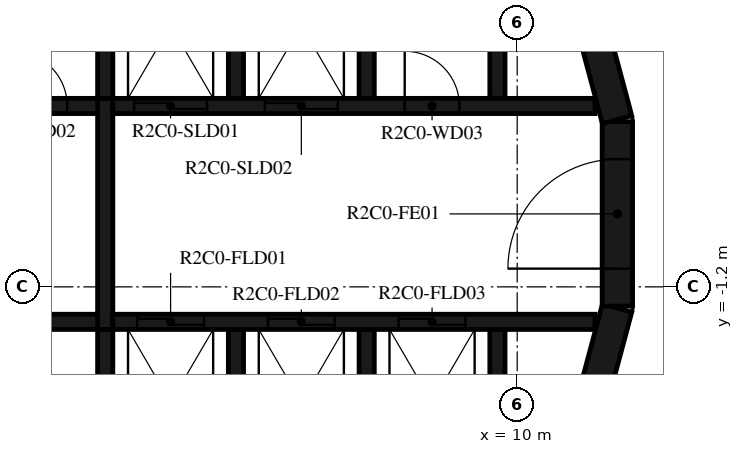
"""IFC4 building model, lengths in metres.
Left out: names, types, materials, properties, quantities, classifications, styles, units other than length and angle.
Written with IfcOpenShell. Run it as: python <this file> out.ifc"""

import sys

from ifc_helpers import new_model, si_unit, direction, frame, frame_2d, origin, place, context, subcontext, project, spatial, polyline, rectangle, outline, extrude, element, fill, save


model = new_model("IFC4")
c1 = context("Model", 3, precision=1e-05, world=origin(), true_north=direction((0.0, 1.0)))
c2 = subcontext(c1, "Body", "Model", "MODEL_VIEW")
j1 = project(units=[si_unit("LENGTHUNIT", "METRE"), si_unit("PLANEANGLEUNIT", "RADIAN")], contexts=[c1])
p1 = place(None, origin())
s1 = spatial("IfcSite", under=j1, at=p1, CompositionType="ELEMENT")
p2 = place(p1, origin())
s2 = spatial("IfcBuilding", under=s1, at=p2, CompositionType="ELEMENT")
p3 = place(p2, frame((0.0, 0.0, 97.7)))
s3 = spatial("IfcBuildingStorey", under=s2, at=p3, CompositionType="ELEMENT", Elevation=97.7)
p4 = place(p3, frame((10.858, -4.479, 0.0), z_axis=(0.0, 0.0, 1.0), x_axis=(0.258734743916, 0.965948410781, 0.0)))
e1 = element("IfcWall", 1, at=p4, inside=s3, PredefinedType="SHEAR", context=c2, shape_type="SweptSolid", body=[
    extrude(rectangle(XDim=3.033, YDim=0.5, at=frame_2d((1.516, 0.0))), origin(), (0.0, 0.0, 1.0), 3.12),
])
p5 = place(p3, frame((11.647, -1.516, 0.0), z_axis=(0.0, 0.0, 1.0), x_axis=(0.0, 1.0, 0.0)))
e2 = element("IfcWall", 2, at=p5, inside=s3, PredefinedType="SHEAR", context=c2, shape_type="SweptSolid", body=[
    extrude(rectangle(XDim=3.033, YDim=0.5, at=frame_2d((1.516, 0.0))), origin(), (0.0, 0.0, 1.0), 3.12),
])
p6 = place(p5, frame((0.616, 0.0, 0.0)))
e3 = element("IfcOpeningElement", 3, at=p6, cuts=e2, PredefinedType="OPENING", context=c2, shape_type="SweptSolid", body=[
    extrude(rectangle(XDim=1.8, YDim=2.1, at=frame_2d((0.9, 1.05))), frame((0.0, 0.26, 0.0), z_axis=(0.0, -1.0, 0.0), x_axis=(1.0, 0.0, 0.0)), (0.0, 0.0, 1.0), 0.52),
])
p7 = place(p3, frame((11.643, 1.55, 0.0), z_axis=(0.0, 0.0, 1.0), x_axis=(-0.258734743916, 0.965948410781, 0.0)))
e4 = element("IfcWall", 4, at=p7, inside=s3, PredefinedType="SHEAR", context=c2, shape_type="SweptSolid", body=[
    extrude(rectangle(XDim=3.033, YDim=0.5, at=frame_2d((1.516, 0.0))), origin(), (0.0, 0.0, 1.0), 3.12),
])
p8 = place(p3, origin())
e5 = element("IfcWall", 5, at=p8, inside=s3, PredefinedType="SHEAR", context=c2, shape_type="SweptSolid", body=[
    extrude(outline(polyline([(-9.55, 4.8), (-7.65, 4.8), (-7.65, 1.9), (-7.4, 1.9), (-7.4, 4.8), (-5.5, 4.8), (-5.5, 1.9), (-5.25, 1.9), (-5.25, 4.8), (-3.35, 4.8), (-3.35, 1.9), (-3.1, 1.9), (-3.1, 4.8), (-1.2, 4.8), (-1.2, 1.9), (-0.95, 1.9), (-0.95, 4.8), (0.95, 4.8), (0.95, 1.9), (1.2, 1.9), (1.2, 4.8), (3.1, 4.8), (3.1, 1.9), (3.35, 1.9), (3.35, 4.8), (5.25, 4.8), (5.25, 1.9), (5.5, 1.9), (5.5, 4.8), (7.4, 4.8), (7.4, 1.9), (7.65, 1.9), (7.65, 4.8), (9.55, 4.8), (9.55, 1.9), (9.8, 1.9), (9.8, 4.8), (9.8, 5.05), (-9.8, 5.05), (-9.8, 4.8), (-9.8, 1.9), (-9.55, 1.9), (-9.55, 4.8)])), origin(), (0.0, 0.0, 1.0), 3.12),
])
p9 = place(p3, origin())
e6 = element("IfcWall", 6, at=p9, inside=s3, PredefinedType="SHEAR", context=c2, shape_type="SweptSolid", body=[
    extrude(outline(polyline([(9.8, -5.05), (9.8, -4.8), (9.8, -1.9), (9.55, -1.9), (9.55, -4.8), (7.65, -4.8), (7.65, -1.9), (7.4, -1.9), (7.4, -4.8), (5.5, -4.8), (5.5, -1.9), (5.25, -1.9), (5.25, -4.8), (3.35, -4.8), (3.35, -1.9), (3.1, -1.9), (3.1, -4.8), (-5.25, -4.8), (-5.25, -1.9), (-5.5, -1.9), (-5.5, -4.8), (-7.4, -4.8), (-7.4, -1.9), (-7.65, -1.9), (-7.65, -4.8), (-9.55, -4.8), (-9.55, -1.9), (-9.8, -1.9), (-9.8, -4.8), (-9.8, -5.05), (9.8, -5.05)])), origin(), (0.0, 0.0, 1.0), 3.12),
])
p10 = place(p3, frame((-11.28, 1.775, 0.0), z_axis=(0.0, 0.0, 1.0), x_axis=(1.0, 0.0, 0.0)))
e7 = element("IfcWall", 7, at=p10, inside=s3, PredefinedType="SHEAR", context=c2, shape_type="SweptSolid", body=[
    extrude(rectangle(XDim=14.38, YDim=0.25, at=frame_2d((7.19, 0.0))), origin(), (0.0, 0.0, 1.0), 3.12),
])
p11 = place(p10, frame((2.13, 0.0, 0.0)))
e8 = element("IfcOpeningElement", 8, at=p11, cuts=e7, PredefinedType="OPENING", context=c2, shape_type="SweptSolid", body=[
    extrude(rectangle(XDim=1.1, YDim=2.1, at=frame_2d((0.55, 1.05))), frame((0.0, 0.135, 0.0), z_axis=(0.0, -1.0, 0.0), x_axis=(1.0, 0.0, 0.0)), (0.0, 0.0, 1.0), 0.27),
])
p12 = place(p10, frame((4.28, 0.0, 0.0)))
e9 = element("IfcOpeningElement", 9, at=p12, cuts=e7, PredefinedType="OPENING", context=c2, shape_type="SweptSolid", body=[
    extrude(rectangle(XDim=1.1, YDim=2.1, at=frame_2d((0.55, 1.05))), frame((0.0, 0.135, 0.0), z_axis=(0.0, -1.0, 0.0), x_axis=(1.0, 0.0, 0.0)), (0.0, 0.0, 1.0), 0.27),
])
p13 = place(p10, frame((6.43, 0.0, 0.0)))
e10 = element("IfcOpeningElement", 10, at=p13, cuts=e7, PredefinedType="OPENING", context=c2, shape_type="SweptSolid", body=[
    extrude(rectangle(XDim=1.1, YDim=2.1, at=frame_2d((0.55, 1.05))), frame((0.0, 0.135, 0.0), z_axis=(0.0, -1.0, 0.0), x_axis=(1.0, 0.0, 0.0)), (0.0, 0.0, 1.0), 0.27),
])
p14 = place(p10, frame((8.58, 0.0, 0.0)))
e11 = element("IfcOpeningElement", 11, at=p14, cuts=e7, PredefinedType="OPENING", context=c2, shape_type="SweptSolid", body=[
    extrude(rectangle(XDim=1.1, YDim=2.1, at=frame_2d((0.55, 1.05))), frame((0.0, 0.135, 0.0), z_axis=(0.0, -1.0, 0.0), x_axis=(1.0, 0.0, 0.0)), (0.0, 0.0, 1.0), 0.27),
])
p15 = place(p10, frame((10.83, 0.0, 0.0)))
e12 = element("IfcOpeningElement", 12, at=p15, cuts=e7, PredefinedType="OPENING", context=c2, shape_type="SweptSolid", body=[
    extrude(rectangle(XDim=0.9, YDim=2.1, at=frame_2d((0.45, 1.05))), frame((0.0, 0.135, 0.0), z_axis=(0.0, -1.0, 0.0), x_axis=(1.0, 0.0, 0.0)), (0.0, 0.0, 1.0), 0.27),
])
p16 = place(p10, frame((12.98, 0.0, 0.0)))
e13 = element("IfcOpeningElement", 13, at=p16, cuts=e7, PredefinedType="OPENING", context=c2, shape_type="SweptSolid", body=[
    extrude(rectangle(XDim=0.9, YDim=2.1, at=frame_2d((0.45, 1.05))), frame((0.0, 0.135, 0.0), z_axis=(0.0, -1.0, 0.0), x_axis=(1.0, 0.0, 0.0)), (0.0, 0.0, 1.0), 0.27),
])
p17 = place(p3, frame((3.35, 1.775, 0.0), z_axis=(0.0, 0.0, 1.0), x_axis=(1.0, 0.0, 0.0)))
e14 = element("IfcWall", 14, at=p17, inside=s3, PredefinedType="SHEAR", context=c2, shape_type="SweptSolid", body=[
    extrude(rectangle(XDim=7.93, YDim=0.25, at=frame_2d((3.965, 0.0))), origin(), (0.0, 0.0, 1.0), 3.12),
])
p18 = place(p17, frame((0.35, 0.0, 0.0)))
e15 = element("IfcOpeningElement", 15, at=p18, cuts=e14, PredefinedType="OPENING", context=c2, shape_type="SweptSolid", body=[
    extrude(rectangle(XDim=1.2, YDim=2.4, at=frame_2d((0.6, 1.2))), frame((0.0, 0.135, 0.0), z_axis=(0.0, -1.0, 0.0), x_axis=(1.0, 0.0, 0.0)), (0.0, 0.0, 1.0), 0.27),
])
p19 = place(p17, frame((2.5, 0.0, 0.0)))
e16 = element("IfcOpeningElement", 16, at=p19, cuts=e14, PredefinedType="OPENING", context=c2, shape_type="SweptSolid", body=[
    extrude(rectangle(XDim=1.2, YDim=2.4, at=frame_2d((0.6, 1.2))), frame((0.0, 0.135, 0.0), z_axis=(0.0, -1.0, 0.0), x_axis=(1.0, 0.0, 0.0)), (0.0, 0.0, 1.0), 0.27),
])
p20 = place(p17, frame((4.8, 0.0, 0.0)))
e17 = element("IfcOpeningElement", 17, at=p20, cuts=e14, PredefinedType="OPENING", context=c2, shape_type="SweptSolid", body=[
    extrude(rectangle(XDim=0.9, YDim=2.1, at=frame_2d((0.45, 1.05))), frame((0.0, 0.135, 0.0), z_axis=(0.0, -1.0, 0.0), x_axis=(1.0, 0.0, 0.0)), (0.0, 0.0, 1.0), 0.27),
])
p21 = place(p3, frame((-11.28, -1.775, 0.0), z_axis=(0.0, 0.0, 1.0), x_axis=(1.0, 0.0, 0.0)))
e18 = element("IfcWall", 18, at=p21, inside=s3, PredefinedType="SHEAR", context=c2, shape_type="SweptSolid", body=[
    extrude(rectangle(XDim=14.38, YDim=0.25, at=frame_2d((7.19, 0.0))), origin(), (0.0, 0.0, 1.0), 3.12),
])
p22 = place(p21, frame((9.755, 0.0, 0.0)))
e19 = element("IfcOpeningElement", 19, at=p22, cuts=e18, PredefinedType="OPENING", context=c2, shape_type="SweptSolid", body=[
    extrude(rectangle(XDim=0.9, YDim=2.1, at=frame_2d((0.45, 1.05))), frame((0.0, 0.135, 0.0), z_axis=(0.0, -1.0, 0.0), x_axis=(1.0, 0.0, 0.0)), (0.0, 0.0, 1.0), 0.27),
])
p23 = place(p3, frame((3.35, -1.775, 0.0), z_axis=(0.0, 0.0, 1.0), x_axis=(1.0, 0.0, 0.0)))
e20 = element("IfcWall", 20, at=p23, inside=s3, PredefinedType="SHEAR", context=c2, shape_type="SweptSolid", body=[
    extrude(rectangle(XDim=7.93, YDim=0.25, at=frame_2d((3.965, 0.0))), origin(), (0.0, 0.0, 1.0), 3.12),
])
p24 = place(p23, frame((0.4, 0.0, 0.0)))
e21 = element("IfcOpeningElement", 21, at=p24, cuts=e20, PredefinedType="OPENING", context=c2, shape_type="SweptSolid", body=[
    extrude(rectangle(XDim=1.1, YDim=2.4, at=frame_2d((0.55, 1.2))), frame((0.0, 0.135, 0.0), z_axis=(0.0, -1.0, 0.0), x_axis=(1.0, 0.0, 0.0)), (0.0, 0.0, 1.0), 0.27),
])
p25 = place(p23, frame((2.55, 0.0, 0.0)))
e22 = element("IfcOpeningElement", 22, at=p25, cuts=e20, PredefinedType="OPENING", context=c2, shape_type="SweptSolid", body=[
    extrude(rectangle(XDim=1.1, YDim=2.4, at=frame_2d((0.55, 1.2))), frame((0.0, 0.135, 0.0), z_axis=(0.0, -1.0, 0.0), x_axis=(1.0, 0.0, 0.0)), (0.0, 0.0, 1.0), 0.27),
])
p26 = place(p23, frame((4.7, 0.0, 0.0)))
e23 = element("IfcOpeningElement", 23, at=p26, cuts=e20, PredefinedType="OPENING", context=c2, shape_type="SweptSolid", body=[
    extrude(rectangle(XDim=1.1, YDim=2.4, at=frame_2d((0.55, 1.2))), frame((0.0, 0.135, 0.0), z_axis=(0.0, -1.0, 0.0), x_axis=(1.0, 0.0, 0.0)), (0.0, 0.0, 1.0), 0.27),
])
p27 = place(p3, frame((3.225, -1.9, 0.0), z_axis=(0.0, 0.0, 1.0), x_axis=(0.0, 1.0, 0.0)))
e24 = element("IfcWall", 24, at=p27, inside=s3, PredefinedType="SHEAR", context=c2, shape_type="SweptSolid", body=[
    extrude(rectangle(XDim=3.8, YDim=0.25, at=frame_2d((1.9, 0.0))), origin(), (0.0, 0.0, 1.0), 3.12),
])
p28 = place(p3, frame((11.1, -8.829, 0.0), z_axis=(0.0, 0.0, 1.0), x_axis=(0.398741918631, 0.917063183388, 0.0)))
e25 = element("IfcWall", 25, at=p28, inside=s3, PredefinedType="STANDARD", context=c2, shape_type="SweptSolid", body=[
    extrude(rectangle(XDim=7.342, YDim=0.2, at=frame_2d((3.671, 0.0))), origin(), (0.0, 0.0, 1.0), 3.12),
])
p29 = place(p6, origin())
e26 = element("IfcDoor", 26, at=p29, inside=s3, OperationType="DOUBLE_DOOR_SINGLE_SWING", PredefinedType="DOOR", context=c2, shape_type="SweptSolid", body=[
    extrude(rectangle(XDim=1.8, YDim=2.1, at=frame_2d((0.9, 1.05))), frame((0.0, 0.025, 0.0), z_axis=(0.0, -1.0, 0.0), x_axis=(1.0, 0.0, 0.0)), (0.0, 0.0, 1.0), 0.05),
])
fill(e3, e26)
p30 = place(p18, origin())
e27 = element("IfcDoor", 27, at=p30, inside=s3, OperationType="DOUBLE_DOOR_SLIDING", PredefinedType="DOOR", context=c2, shape_type="SweptSolid", body=[
    extrude(rectangle(XDim=1.2, YDim=2.4, at=frame_2d((0.6, 1.2))), frame((0.0, 0.025, 0.0), z_axis=(0.0, -1.0, 0.0), x_axis=(1.0, 0.0, 0.0)), (0.0, 0.0, 1.0), 0.05),
])
fill(e15, e27)
p31 = place(p19, origin())
e28 = element("IfcDoor", 28, at=p31, inside=s3, OperationType="DOUBLE_DOOR_SLIDING", PredefinedType="DOOR", context=c2, shape_type="SweptSolid", body=[
    extrude(rectangle(XDim=1.2, YDim=2.4, at=frame_2d((0.6, 1.2))), frame((0.0, 0.025, 0.0), z_axis=(0.0, -1.0, 0.0), x_axis=(1.0, 0.0, 0.0)), (0.0, 0.0, 1.0), 0.05),
])
fill(e16, e28)
p32 = place(p24, origin())
e29 = element("IfcDoor", 29, at=p32, inside=s3, OperationType="DOUBLE_DOOR_SLIDING", PredefinedType="DOOR", context=c2, shape_type="SweptSolid", body=[
    extrude(rectangle(XDim=1.1, YDim=2.4, at=frame_2d((0.55, 1.2))), frame((0.0, 0.025, 0.0), z_axis=(0.0, -1.0, 0.0), x_axis=(1.0, 0.0, 0.0)), (0.0, 0.0, 1.0), 0.05),
])
fill(e21, e29)
p33 = place(p25, origin())
e30 = element("IfcDoor", 30, at=p33, inside=s3, OperationType="DOUBLE_DOOR_SLIDING", PredefinedType="DOOR", context=c2, shape_type="SweptSolid", body=[
    extrude(rectangle(XDim=1.1, YDim=2.4, at=frame_2d((0.55, 1.2))), frame((0.0, 0.025, 0.0), z_axis=(0.0, -1.0, 0.0), x_axis=(1.0, 0.0, 0.0)), (0.0, 0.0, 1.0), 0.05),
])
fill(e22, e30)
p34 = place(p26, origin())
e31 = element("IfcDoor", 31, at=p34, inside=s3, OperationType="DOUBLE_DOOR_SLIDING", PredefinedType="DOOR", context=c2, shape_type="SweptSolid", body=[
    extrude(rectangle(XDim=1.1, YDim=2.4, at=frame_2d((0.55, 1.2))), frame((0.0, 0.025, 0.0), z_axis=(0.0, -1.0, 0.0), x_axis=(1.0, 0.0, 0.0)), (0.0, 0.0, 1.0), 0.05),
])
fill(e23, e31)
p35 = place(p16, origin())
e32 = element("IfcDoor", 32, at=p35, inside=s3, OperationType="SINGLE_SWING_LEFT", PredefinedType="DOOR", context=c2, shape_type="SweptSolid", body=[
    extrude(rectangle(XDim=0.9, YDim=2.1, at=frame_2d((0.45, 1.05))), frame((0.0, 0.025, 0.0), z_axis=(0.0, -1.0, 0.0), x_axis=(1.0, 0.0, 0.0)), (0.0, 0.0, 1.0), 0.05),
])
fill(e13, e32)
p36 = place(p20, origin())
e33 = element("IfcDoor", 33, at=p36, inside=s3, OperationType="SINGLE_SWING_RIGHT", PredefinedType="DOOR", context=c2, shape_type="SweptSolid", body=[
    extrude(rectangle(XDim=0.9, YDim=2.1, at=frame_2d((0.45, 1.05))), frame((0.0, 0.025, 0.0), z_axis=(0.0, -1.0, 0.0), x_axis=(1.0, 0.0, 0.0)), (0.0, 0.0, 1.0), 0.05),
])
fill(e17, e33)
save(model, sys.argv[1])
